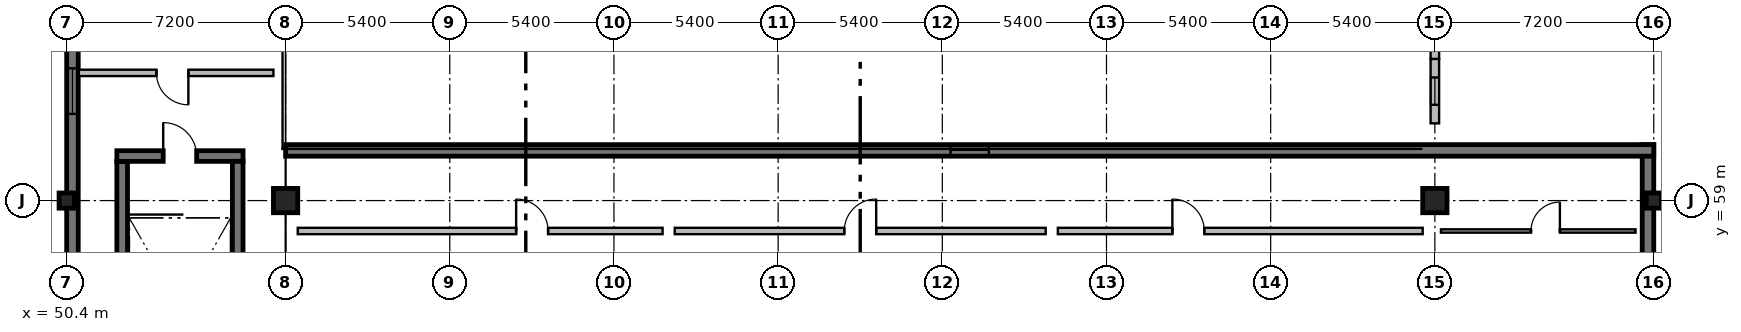
"""IFC4 building model, lengths in metres.
Left out: names, types, materials, properties, quantities, classifications, styles, units other than length and angle.
Written with IfcOpenShell. Run it as: python <this file> out.ifc"""

import sys

from ifc_helpers import new_model, si_unit, direction, frame, frame_2d, origin, origin_2d, place, context, subcontext, project, spatial, rectangle, extrude, element, fill, save


model = new_model("IFC4")
c1 = context("Model", 3, precision=1e-05, world=origin(), true_north=direction((0.0, 1.0)))
c2 = subcontext(c1, "Body", "Model", "MODEL_VIEW")
j1 = project(units=[si_unit("LENGTHUNIT", "METRE"), si_unit("PLANEANGLEUNIT", "RADIAN")], contexts=[c1])
p1 = place(None, origin())
s1 = spatial("IfcSite", under=j1, at=p1, CompositionType="ELEMENT")
p2 = place(p1, origin())
s2 = spatial("IfcBuilding", under=s1, at=p2, CompositionType="ELEMENT")
p3 = place(p2, frame((0.0, 0.0, 13.2)))
s3 = spatial("IfcBuildingStorey", under=s2, at=p3, CompositionType="ELEMENT", Elevation=13.2)
p4 = place(p3, frame((95.4, 59.0, 0.0), z_axis=(0.0, 0.0, 1.0), x_axis=(1.0, 0.0, 0.0)))
e1 = element("IfcColumn", 1, at=p4, inside=s3, PredefinedType="COLUMN", context=c2, shape_type="SweptSolid", body=[
    extrude(rectangle(XDim=0.8, YDim=0.8, at=origin_2d()), origin(), (0.0, 0.0, 1.0), 5.542),
])
for number, where, z_axis, x_axis in (
    (2, (102.6, 59.0, 0.0), (0.0, 0.0, 1.0), (1.0, 0.0, 0.0)),
    (3, (50.4, 59.0, 0.0), (0.0, 0.0, 1.0), (1.0, 0.0, 0.0)),
):
    element("IfcColumn", number, at=place(p3, frame(where, z_axis=z_axis, x_axis=x_axis)), inside=s3, PredefinedType="COLUMN", context=c2, shape_type="SweptSolid", body=[
        extrude(rectangle(XDim=0.5, YDim=0.5, at=origin_2d()), origin(), (0.0, 0.0, 1.0), 3.9),
    ])
p5 = place(p3, frame((57.6, 59.0, 0.0), z_axis=(0.0, 0.0, 1.0), x_axis=(1.0, 0.0, 0.0)))
e4 = element("IfcColumn", 4, at=p5, inside=s3, PredefinedType="COLUMN", context=c2, shape_type="SweptSolid", body=[
    extrude(rectangle(XDim=0.8, YDim=0.8, at=origin_2d()), origin(), (0.0, 0.0, 1.0), 5.542),
])
p6 = place(p3, frame((52.225, 52.49, 0.0), z_axis=(0.0, 0.0, 1.0), x_axis=(0.0, 1.0, 0.0)))
e5 = element("IfcWall", 5, at=p6, inside=s3, PredefinedType="SOLIDWALL", context=c2, shape_type="SweptSolid", body=[
    extrude(rectangle(XDim=7.8, YDim=0.35, at=frame_2d((3.9, 0.0))), origin(), (0.0, 0.0, 1.0), 4.3),
])
p7 = place(p3, frame((52.05, 60.465, 0.0), z_axis=(0.0, 0.0, 1.0), x_axis=(1.0, 0.0, 0.0)))
e6 = element("IfcWall", 6, at=p7, inside=s3, PredefinedType="SOLIDWALL", context=c2, shape_type="SweptSolid", body=[
    extrude(rectangle(XDim=4.15, YDim=0.35, at=frame_2d((2.075, 0.0))), origin(), (0.0, 0.0, 1.0), 4.3),
])
p8 = place(p7, frame((1.525, 0.0, 0.0)))
e7 = element("IfcOpeningElement", 7, at=p8, cuts=e6, PredefinedType="OPENING", context=c2, shape_type="SweptSolid", body=[
    extrude(rectangle(XDim=1.1, YDim=2.15, at=frame_2d((0.55, 1.075))), frame((0.0, 0.195, 0.0), z_axis=(0.0, -1.0, 0.0), x_axis=(1.0, 0.0, 0.0)), (0.0, 0.0, 1.0), 0.39),
])
p9 = place(p3, frame((56.025, 60.29, 0.0), z_axis=(0.0, 0.0, 1.0), x_axis=(0.0, -1.0, 0.0)))
e8 = element("IfcWall", 8, at=p9, inside=s3, PredefinedType="SOLIDWALL", context=c2, shape_type="SweptSolid", body=[
    extrude(rectangle(XDim=7.8, YDim=0.35, at=frame_2d((3.9, 0.0))), origin(), (0.0, 0.0, 1.0), 4.3),
])
p10 = place(p3, frame((50.59, 51.8, 0.0), z_axis=(0.0, 0.0, 1.0), x_axis=(0.0, 1.0, 0.0)))
e9 = element("IfcWall", 9, at=p10, inside=s3, PredefinedType="SOLIDWALL", context=c2, shape_type="SweptSolid", body=[
    extrude(rectangle(XDim=36.0, YDim=0.38, at=frame_2d((18.0, 0.0))), origin(), (0.0, 0.0, 1.0), 3.65),
])
p11 = place(p10, frame((2.975, 0.0, 0.95)))
e10 = element("IfcOpeningElement", 10, at=p11, cuts=e9, PredefinedType="OPENING", context=c2, shape_type="SweptSolid", body=[
    extrude(rectangle(XDim=1.25, YDim=1.9, at=frame_2d((0.625, 0.95))), frame((0.0, 0.21, 0.0), z_axis=(0.0, -1.0, 0.0), x_axis=(1.0, 0.0, 0.0)), (0.0, 0.0, 1.0), 0.42),
])
p12 = place(p10, frame((10.05, 0.0, 0.95)))
e11 = element("IfcOpeningElement", 11, at=p12, cuts=e9, PredefinedType="OPENING", context=c2, shape_type="SweptSolid", body=[
    extrude(rectangle(XDim=1.5, YDim=2.0, at=frame_2d((0.75, 1.0))), frame((0.0, 0.21, 0.0), z_axis=(0.0, -1.0, 0.0), x_axis=(1.0, 0.0, 0.0)), (0.0, 0.0, 1.0), 0.42),
])
p13 = place(p10, frame((17.445, 0.0, 0.95)))
e12 = element("IfcOpeningElement", 12, at=p13, cuts=e9, PredefinedType="OPENING", context=c2, shape_type="SweptSolid", body=[
    extrude(rectangle(XDim=1.11, YDim=1.85, at=frame_2d((0.555, 0.925))), frame((0.0, 0.21, 0.0), z_axis=(0.0, -1.0, 0.0), x_axis=(1.0, 0.0, 0.0)), (0.0, 0.0, 1.0), 0.42),
])
p14 = place(p10, frame((24.525, 0.0, 0.95)))
e13 = element("IfcOpeningElement", 13, at=p14, cuts=e9, PredefinedType="OPENING", context=c2, shape_type="SweptSolid", body=[
    extrude(rectangle(XDim=1.35, YDim=1.7, at=frame_2d((0.675, 0.85))), frame((0.0, 0.21, 0.0), z_axis=(0.0, -1.0, 0.0), x_axis=(1.0, 0.0, 0.0)), (0.0, 0.0, 1.0), 0.42),
])
p15 = place(p10, frame((31.77, 0.0, 0.95)))
e14 = element("IfcOpeningElement", 14, at=p15, cuts=e9, PredefinedType="OPENING", context=c2, shape_type="SweptSolid", body=[
    extrude(rectangle(XDim=1.26, YDim=1.65, at=frame_2d((0.63, 0.825))), frame((0.0, 0.21, 0.0), z_axis=(0.0, -1.0, 0.0), x_axis=(1.0, 0.0, 0.0)), (0.0, 0.0, 1.0), 0.42),
])
p16 = place(p3, frame((102.41, 51.8, 0.0), z_axis=(0.0, 0.0, 1.0), x_axis=(0.0, 1.0, 0.0)))
e15 = element("IfcWall", 15, at=p16, inside=s3, PredefinedType="SOLIDWALL", context=c2, shape_type="SweptSolid", body=[
    extrude(rectangle(XDim=9.04, YDim=0.38, at=frame_2d((4.52, 0.0))), origin(), (0.0, 0.0, 1.0), 3.65),
])
p17 = place(p16, frame((2.985, 0.0, 0.95)))
e16 = element("IfcOpeningElement", 16, at=p17, cuts=e15, PredefinedType="OPENING", context=c2, shape_type="SweptSolid", body=[
    extrude(rectangle(XDim=1.23, YDim=1.65, at=frame_2d((0.615, 0.825))), frame((0.0, 0.21, 0.0), z_axis=(0.0, -1.0, 0.0), x_axis=(1.0, 0.0, 0.0)), (0.0, 0.0, 1.0), 0.42),
])
p18 = place(p3, frame((57.6, 60.65, 0.0), z_axis=(0.0, 0.0, 1.0), x_axis=(1.0, 0.0, 0.0)))
e17 = element("IfcWall", 17, at=p18, inside=s3, PredefinedType="SOLIDWALL", context=c2, shape_type="SweptSolid", body=[
    extrude(rectangle(XDim=45.0, YDim=0.38, at=frame_2d((22.5, 0.0))), origin(), (0.0, 0.0, 1.0), 3.65),
])
p19 = place(p18, frame((21.87, 0.0, 0.95)))
e18 = element("IfcOpeningElement", 18, at=p19, cuts=e17, PredefinedType="OPENING", context=c2, shape_type="SweptSolid", body=[
    extrude(rectangle(XDim=1.26, YDim=1.65, at=frame_2d((0.63, 0.825))), frame((0.0, 0.21, 0.0), z_axis=(0.0, -1.0, 0.0), x_axis=(1.0, 0.0, 0.0)), (0.0, 0.0, 1.0), 0.42),
])
p20 = place(p3, frame((95.4, 61.54, -0.02), z_axis=(0.0, 0.0, 1.0), x_axis=(0.0, 1.0, 0.0)))
e19 = element("IfcWall", 19, at=p20, inside=s3, PredefinedType="SOLIDWALL", context=c2, shape_type="SweptSolid", body=[
    extrude(rectangle(XDim=2.12, YDim=0.28, at=frame_2d((1.06, 0.0))), origin(), (0.0, 0.0, 1.0), 4.427),
])
p21 = place(p20, frame((0.61, 0.0, 0.35)))
e20 = element("IfcOpeningElement", 20, at=p21, cuts=e19, PredefinedType="OPENING", context=c2, shape_type="SweptSolid", body=[
    extrude(rectangle(XDim=0.9, YDim=2.2, at=frame_2d((0.45, 1.1))), frame((0.0, 0.16, 0.0), z_axis=(0.0, -1.0, 0.0), x_axis=(1.0, 0.0, 0.0)), (0.0, 0.0, 1.0), 0.32),
])
p22 = place(p3, frame((95.4, 63.66, -0.02), z_axis=(0.0, 0.0, 1.0), x_axis=(0.0, 1.0, 0.0)))
e21 = element("IfcWall", 21, at=p22, inside=s3, PredefinedType="SOLIDWALL", context=c2, shape_type="SweptSolid", body=[
    extrude(rectangle(XDim=2.12, YDim=0.28, at=frame_2d((1.06, 0.0))), origin(), (0.0, 0.0, 1.0), 4.427),
])
p23 = place(p22, frame((0.61, 0.0, 0.35)))
e22 = element("IfcOpeningElement", 22, at=p23, cuts=e21, PredefinedType="OPENING", context=c2, shape_type="SweptSolid", body=[
    extrude(rectangle(XDim=0.9, YDim=2.2, at=frame_2d((0.45, 1.1))), frame((0.0, 0.16, 0.0), z_axis=(0.0, -1.0, 0.0), x_axis=(1.0, 0.0, 0.0)), (0.0, 0.0, 1.0), 0.32),
])
p24 = place(p3, frame((58.0, 58.0, 0.0), z_axis=(0.0, 0.0, 1.0), x_axis=(1.0, 0.0, 0.0)))
e23 = element("IfcWall", 23, at=p24, inside=s3, PredefinedType="PARTITIONING", context=c2, shape_type="SweptSolid", body=[
    extrude(rectangle(XDim=12.0, YDim=0.21, at=frame_2d((6.0, 0.0))), origin(), (0.0, 0.0, 1.0), 3.66),
])
p25 = place(p24, frame((7.183, 0.0, 0.0)))
e24 = element("IfcOpeningElement", 24, at=p25, cuts=e23, PredefinedType="OPENING", context=c2, shape_type="SweptSolid", body=[
    extrude(rectangle(XDim=1.05, YDim=2.15, at=frame_2d((0.525, 1.075))), frame((0.0, 0.125, 0.0), z_axis=(0.0, -1.0, 0.0), x_axis=(1.0, 0.0, 0.0)), (0.0, 0.0, 1.0), 0.25),
])
p26 = place(p3, frame((70.4, 58.0, 0.0), z_axis=(0.0, 0.0, 1.0), x_axis=(1.0, 0.0, 0.0)))
e25 = element("IfcWall", 25, at=p26, inside=s3, PredefinedType="PARTITIONING", context=c2, shape_type="SweptSolid", body=[
    extrude(rectangle(XDim=12.2, YDim=0.21, at=frame_2d((6.1, 0.0))), origin(), (0.0, 0.0, 1.0), 3.66),
])
p27 = place(p26, frame((5.575, 0.0, 0.0)))
e26 = element("IfcOpeningElement", 26, at=p27, cuts=e25, PredefinedType="OPENING", context=c2, shape_type="SweptSolid", body=[
    extrude(rectangle(XDim=1.05, YDim=2.15, at=frame_2d((0.525, 1.075))), frame((0.0, 0.125, 0.0), z_axis=(0.0, -1.0, 0.0), x_axis=(1.0, 0.0, 0.0)), (0.0, 0.0, 1.0), 0.25),
])
p28 = place(p3, frame((83.0, 58.0, 0.0), z_axis=(0.0, 0.0, 1.0), x_axis=(1.0, 0.0, 0.0)))
e27 = element("IfcWall", 27, at=p28, inside=s3, PredefinedType="PARTITIONING", context=c2, shape_type="SweptSolid", body=[
    extrude(rectangle(XDim=12.0, YDim=0.21, at=frame_2d((6.0, 0.0))), origin(), (0.0, 0.0, 1.0), 3.66),
])
p29 = place(p28, frame((3.767, 0.0, 0.0)))
e28 = element("IfcOpeningElement", 28, at=p29, cuts=e27, PredefinedType="OPENING", context=c2, shape_type="SweptSolid", body=[
    extrude(rectangle(XDim=1.05, YDim=2.15, at=frame_2d((0.525, 1.075))), frame((0.0, 0.125, 0.0), z_axis=(0.0, -1.0, 0.0), x_axis=(1.0, 0.0, 0.0)), (0.0, 0.0, 1.0), 0.25),
])
p30 = place(p3, frame((95.6, 58.0, 0.0), z_axis=(0.0, 0.0, 1.0), x_axis=(1.0, 0.0, 0.0)))
e29 = element("IfcWall", 29, at=p30, inside=s3, PredefinedType="PARTITIONING", context=c2, shape_type="SweptSolid", body=[
    extrude(rectangle(XDim=6.4, YDim=0.11, at=frame_2d((3.2, 0.0))), origin(), (0.0, 0.0, 1.0), 3.66),
])
p31 = place(p30, frame((2.962, 0.0, 0.0)))
e30 = element("IfcOpeningElement", 30, at=p31, cuts=e29, PredefinedType="OPENING", context=c2, shape_type="SweptSolid", body=[
    extrude(rectangle(XDim=0.95, YDim=2.1, at=frame_2d((0.475, 1.05))), frame((0.0, 0.075, 0.0), z_axis=(0.0, -1.0, 0.0), x_axis=(1.0, 0.0, 0.0)), (0.0, 0.0, 1.0), 0.15),
])
p32 = place(p3, frame((57.2, 63.2, 0.0), z_axis=(0.0, 0.0, 1.0), x_axis=(-1.0, 0.0, 0.0)))
e31 = element("IfcWall", 31, at=p32, inside=s3, PredefinedType="PARTITIONING", context=c2, shape_type="SweptSolid", body=[
    extrude(rectangle(XDim=6.4, YDim=0.21, at=frame_2d((3.2, 0.0))), origin(), (0.0, 0.0, 1.0), 3.66),
])
p33 = place(p32, frame((2.797, 0.0, 0.0)))
e32 = element("IfcOpeningElement", 32, at=p33, cuts=e31, PredefinedType="OPENING", context=c2, shape_type="SweptSolid", body=[
    extrude(rectangle(XDim=1.05, YDim=2.15, at=frame_2d((0.525, 1.075))), frame((0.0, 0.125, 0.0), z_axis=(0.0, -1.0, 0.0), x_axis=(1.0, 0.0, 0.0)), (0.0, 0.0, 1.0), 0.25),
])
p34 = place(p8, origin())
e33 = element("IfcDoor", 33, at=p34, inside=s3, OperationType="SINGLE_SWING_LEFT", PredefinedType="DOOR", context=c2, shape_type="SweptSolid", body=[
    extrude(rectangle(XDim=1.1, YDim=2.15, at=frame_2d((0.55, 1.075))), frame((0.0, 0.025, 0.0), z_axis=(0.0, -1.0, 0.0), x_axis=(1.0, 0.0, 0.0)), (0.0, 0.0, 1.0), 0.05),
])
fill(e7, e33)
p35 = place(p12, origin())
e34 = element("IfcWindow", 34, at=p35, inside=s3, PartitioningType="SINGLE_PANEL", PredefinedType="WINDOW", context=c2, shape_type="SweptSolid", body=[
    extrude(rectangle(XDim=1.5, YDim=2.0, at=frame_2d((0.75, 1.0))), frame((0.0, 0.03, 0.0), z_axis=(0.0, -1.0, 0.0), x_axis=(1.0, 0.0, 0.0)), (0.0, 0.0, 1.0), 0.06),
])
fill(e11, e34)
p36 = place(p19, origin())
e35 = element("IfcWindow", 35, at=p36, inside=s3, PartitioningType="SINGLE_PANEL", PredefinedType="WINDOW", context=c2, shape_type="SweptSolid", body=[
    extrude(rectangle(XDim=1.26, YDim=1.65, at=frame_2d((0.63, 0.825))), frame((0.0, 0.03, 0.0), z_axis=(0.0, -1.0, 0.0), x_axis=(1.0, 0.0, 0.0)), (0.0, 0.0, 1.0), 0.06),
])
fill(e18, e35)
p37 = place(p21, origin())
e36 = element("IfcWindow", 36, at=p37, inside=s3, PartitioningType="SINGLE_PANEL", PredefinedType="WINDOW", context=c2, shape_type="SweptSolid", body=[
    extrude(rectangle(XDim=0.9, YDim=2.2, at=frame_2d((0.45, 1.1))), frame((0.0, 0.03, 0.0), z_axis=(0.0, -1.0, 0.0), x_axis=(1.0, 0.0, 0.0)), (0.0, 0.0, 1.0), 0.06),
])
fill(e20, e36)
p38 = place(p25, origin())
e37 = element("IfcDoor", 37, at=p38, inside=s3, OperationType="SINGLE_SWING_LEFT", PredefinedType="DOOR", context=c2, shape_type="SweptSolid", body=[
    extrude(rectangle(XDim=1.05, YDim=2.15, at=frame_2d((0.525, 1.075))), frame((0.0, 0.025, 0.0), z_axis=(0.0, -1.0, 0.0), x_axis=(1.0, 0.0, 0.0)), (0.0, 0.0, 1.0), 0.05),
])
fill(e24, e37)
p39 = place(p27, origin())
e38 = element("IfcDoor", 38, at=p39, inside=s3, OperationType="SINGLE_SWING_RIGHT", PredefinedType="DOOR", context=c2, shape_type="SweptSolid", body=[
    extrude(rectangle(XDim=1.05, YDim=2.15, at=frame_2d((0.525, 1.075))), frame((0.0, 0.025, 0.0), z_axis=(0.0, -1.0, 0.0), x_axis=(1.0, 0.0, 0.0)), (0.0, 0.0, 1.0), 0.05),
])
fill(e26, e38)
p40 = place(p29, origin())
e39 = element("IfcDoor", 39, at=p40, inside=s3, OperationType="SINGLE_SWING_LEFT", PredefinedType="DOOR", context=c2, shape_type="SweptSolid", body=[
    extrude(rectangle(XDim=1.05, YDim=2.15, at=frame_2d((0.525, 1.075))), frame((0.0, 0.025, 0.0), z_axis=(0.0, -1.0, 0.0), x_axis=(1.0, 0.0, 0.0)), (0.0, 0.0, 1.0), 0.05),
])
fill(e28, e39)
p41 = place(p31, origin())
e40 = element("IfcDoor", 40, at=p41, inside=s3, OperationType="SINGLE_SWING_RIGHT", PredefinedType="DOOR", context=c2, shape_type="SweptSolid", body=[
    extrude(rectangle(XDim=0.95, YDim=2.1, at=frame_2d((0.475, 1.05))), frame((0.0, 0.025, 0.0), z_axis=(0.0, -1.0, 0.0), x_axis=(1.0, 0.0, 0.0)), (0.0, 0.0, 1.0), 0.05),
])
fill(e30, e40)
p42 = place(p33, origin())
e41 = element("IfcDoor", 41, at=p42, inside=s3, OperationType="SINGLE_SWING_LEFT", PredefinedType="DOOR", context=c2, shape_type="SweptSolid", body=[
    extrude(rectangle(XDim=1.05, YDim=2.15, at=frame_2d((0.525, 1.075))), frame((0.0, 0.025, 0.0), z_axis=(0.0, -1.0, 0.0), x_axis=(1.0, 0.0, 0.0)), (0.0, 0.0, 1.0), 0.05),
])
fill(e32, e41)
save(model, sys.argv[1])
